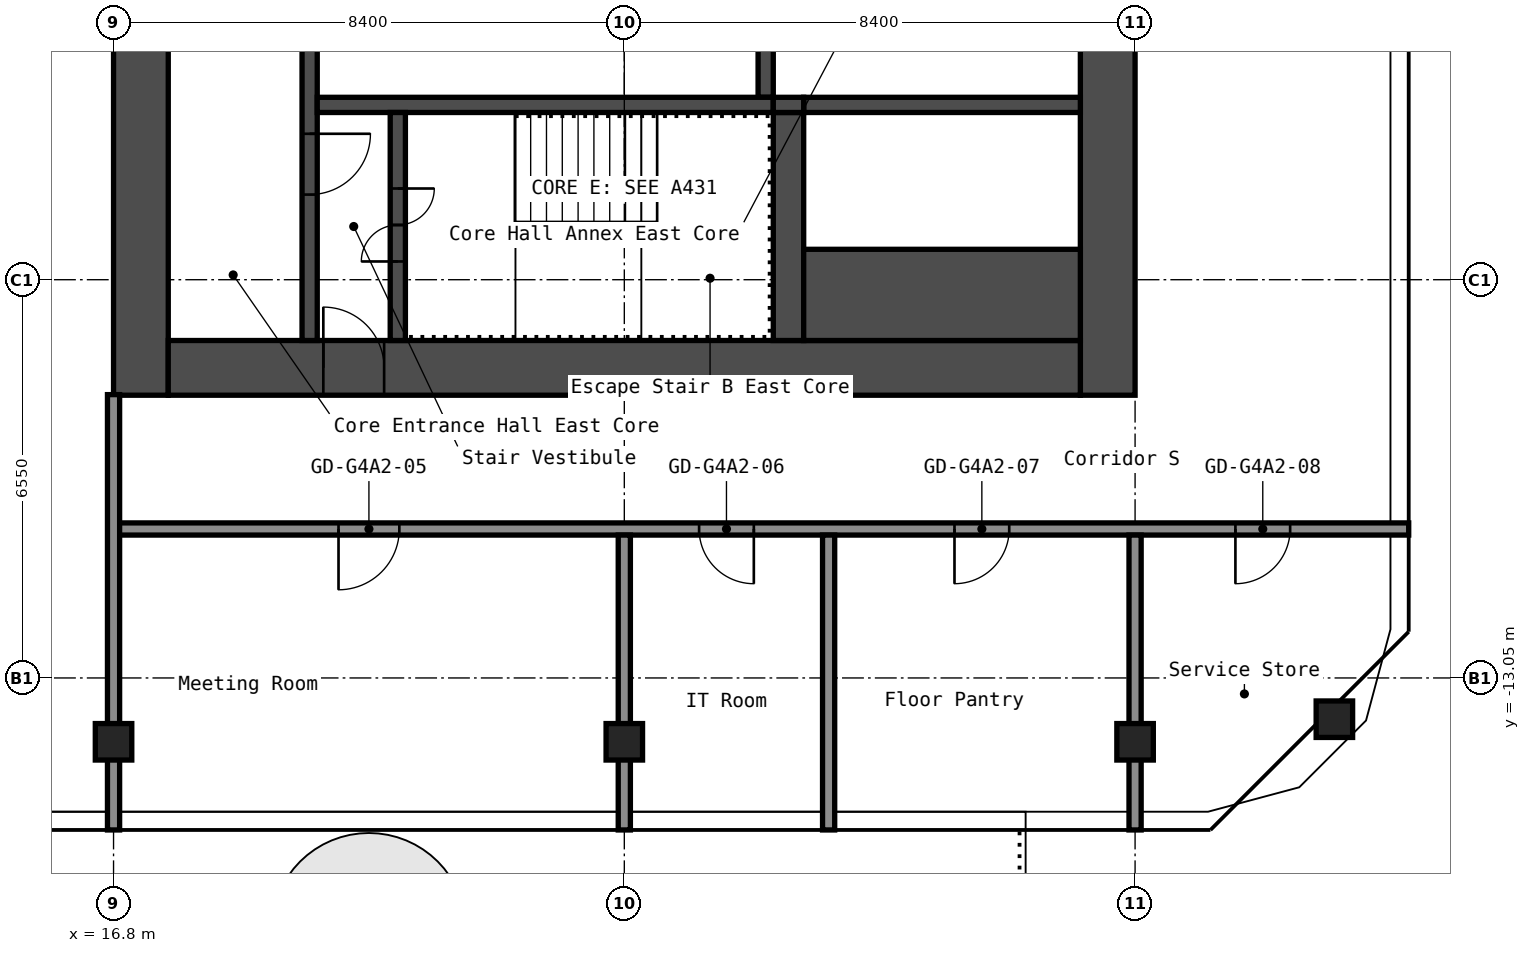
"""IFC4 building model, lengths in metres.
Left out: names, types, materials, properties, quantities, classifications, styles, units other than length and angle.
Written with IfcOpenShell. Run it as: python <this file> out.ifc"""

import sys

from ifc_helpers import new_model, si_unit, direction, frame, frame_2d, origin, origin_2d, place, context, subcontext, project, spatial, rectangle, hollow_rectangle, extrude, element, fill, save


model = new_model("IFC4")
c1 = context("Model", 3, precision=1e-05, world=origin(), true_north=direction((0.0, 1.0)))
c2 = subcontext(c1, "Body", "Model", "MODEL_VIEW")
j1 = project(units=[si_unit("LENGTHUNIT", "METRE"), si_unit("PLANEANGLEUNIT", "RADIAN")], contexts=[c1])
p1 = place(None, origin())
s1 = spatial("IfcSite", under=j1, at=p1, CompositionType="ELEMENT")
p2 = place(p1, origin())
s2 = spatial("IfcBuilding", under=s1, at=p2, CompositionType="ELEMENT")
p3 = place(p2, frame((0.0, 0.0, 218.6)))
s3 = spatial("IfcBuildingStorey", under=s2, at=p3, CompositionType="ELEMENT", Elevation=218.6)
for number, where, z_axis, x_axis in (
    (1, (16.8, -14.1, 0.0), (0.0, 0.0, 1.0), (1.0, 0.0, 0.0)),
    (2, (25.2, -14.1, 0.0), (0.0, 0.0, 1.0), (1.0, 0.0, 0.0)),
    (3, (33.6, -14.1, 0.0), (0.0, 0.0, 1.0), (1.0, 0.0, 0.0)),
    (4, (36.878, -13.729, 0.0), (0.0, 0.0, 1.0), (1.0, 0.0, 0.0)),
):
    element("IfcColumn", number, at=place(p3, frame(where, z_axis=z_axis, x_axis=x_axis)), inside=s3, PredefinedType="COLUMN", context=c2, shape_type="SweptSolid", body=[
        extrude(hollow_rectangle(XDim=0.6, YDim=0.6, WallThickness=0.025, InnerFilletRadius=0.038, OuterFilletRadius=0.062, at=origin_2d()), origin(), (0.0, 0.0, 1.0), 2.75),
    ])
p4 = place(p3, frame((17.25, -8.4, 0.0), z_axis=(0.0, 0.0, 1.0), x_axis=(0.0, 1.0, 0.0)))
e5 = element("IfcWall", 5, at=p4, inside=s3, PredefinedType="SHEAR", context=c2, shape_type="SweptSolid", body=[
    extrude(rectangle(XDim=16.8, YDim=0.9, at=frame_2d((8.4, 0.0))), origin(), (0.0, 0.0, 1.0), 2.75),
])
p5 = place(p4, frame((10.1, 0.0, 0.0)))
e6 = element("IfcOpeningElement", 6, at=p5, cuts=e5, PredefinedType="OPENING", context=c2, shape_type="SweptSolid", body=[
    extrude(rectangle(XDim=1.6, YDim=2.1, at=frame_2d((0.8, 1.05))), frame((0.0, 0.46, 0.0), z_axis=(0.0, -1.0, 0.0), x_axis=(1.0, 0.0, 0.0)), (0.0, 0.0, 1.0), 0.92),
])
p6 = place(p3, frame((33.15, -8.4, 0.0), z_axis=(0.0, 0.0, 1.0), x_axis=(0.0, 1.0, 0.0)))
e7 = element("IfcWall", 7, at=p6, inside=s3, PredefinedType="SHEAR", context=c2, shape_type="SweptSolid", body=[
    extrude(rectangle(XDim=16.8, YDim=0.9, at=frame_2d((8.4, 0.0))), origin(), (0.0, 0.0, 1.0), 2.75),
])
p7 = place(p3, frame((17.7, -7.95, 0.0), z_axis=(0.0, 0.0, 1.0), x_axis=(1.0, 0.0, 0.0)))
e8 = element("IfcWall", 8, at=p7, inside=s3, PredefinedType="SHEAR", context=c2, shape_type="SweptSolid", body=[
    extrude(rectangle(XDim=15.0, YDim=0.9, at=frame_2d((7.5, 0.0))), origin(), (0.0, 0.0, 1.0), 2.75),
])
p8 = place(p7, frame((2.55, 0.0, 0.0)))
e9 = element("IfcOpeningElement", 9, at=p8, cuts=e8, PredefinedType="OPENING", context=c2, shape_type="SweptSolid", body=[
    extrude(rectangle(XDim=1.0, YDim=2.1, at=frame_2d((0.5, 1.05))), frame((0.0, 0.46, 0.0), z_axis=(0.0, -1.0, 0.0), x_axis=(1.0, 0.0, 0.0)), (0.0, 0.0, 1.0), 0.92),
])
p9 = place(p3, frame((20.025, -7.5, 0.0), z_axis=(0.0, 0.0, 1.0), x_axis=(0.0, 1.0, 0.0)))
e10 = element("IfcWall", 10, at=p9, inside=s3, PredefinedType="SHEAR", context=c2, shape_type="SweptSolid", body=[
    extrude(rectangle(XDim=6.3, YDim=0.25, at=frame_2d((3.15, 0.0))), origin(), (0.0, 0.0, 1.0), 2.75),
])
p10 = place(p9, frame((2.4, 0.0, 0.0)))
e11 = element("IfcOpeningElement", 11, at=p10, cuts=e10, PredefinedType="OPENING", context=c2, shape_type="SweptSolid", body=[
    extrude(rectangle(XDim=1.0, YDim=2.1, at=frame_2d((0.5, 1.05))), frame((0.0, 0.135, 0.0), z_axis=(0.0, -1.0, 0.0), x_axis=(1.0, 0.0, 0.0)), (0.0, 0.0, 1.0), 0.27),
])
p11 = place(p3, frame((27.525, -3.5, 0.0), z_axis=(0.0, 0.0, 1.0), x_axis=(0.0, 1.0, 0.0)))
e12 = element("IfcWall", 12, at=p11, inside=s3, PredefinedType="SHEAR", context=c2, shape_type="SweptSolid", body=[
    extrude(rectangle(XDim=2.05, YDim=0.25, at=frame_2d((1.025, 0.0))), origin(), (0.0, 0.0, 1.0), 2.75),
])
p12 = place(p3, frame((20.15, -3.625, 0.0), z_axis=(0.0, 0.0, 1.0), x_axis=(1.0, 0.0, 0.0)))
e13 = element("IfcWall", 13, at=p12, inside=s3, PredefinedType="SHEAR", context=c2, shape_type="SweptSolid", body=[
    extrude(rectangle(XDim=7.5, YDim=0.25, at=frame_2d((3.75, 0.0))), origin(), (0.0, 0.0, 1.0), 2.75),
])
p13 = place(p3, frame((21.475, -7.5, 0.0), z_axis=(0.0, 0.0, 1.0), x_axis=(0.0, 1.0, 0.0)))
e14 = element("IfcWall", 14, at=p13, inside=s3, PredefinedType="SHEAR", context=c2, shape_type="SweptSolid", body=[
    extrude(rectangle(XDim=3.75, YDim=0.25, at=frame_2d((1.875, 0.0))), origin(), (0.0, 0.0, 1.0), 2.75),
])
p14 = place(p13, frame((1.3, 0.0, 0.0)))
e15 = element("IfcOpeningElement", 15, at=p14, cuts=e14, PredefinedType="OPENING", context=c2, shape_type="SweptSolid", body=[
    extrude(rectangle(XDim=1.2, YDim=2.1, at=frame_2d((0.6, 1.05))), frame((0.0, 0.135, 0.0), z_axis=(0.0, -1.0, 0.0), x_axis=(1.0, 0.0, 0.0)), (0.0, 0.0, 1.0), 0.27),
])
p15 = place(p3, frame((27.9, -7.5, 0.0), z_axis=(0.0, 0.0, 1.0), x_axis=(0.0, 1.0, 0.0)))
e16 = element("IfcWall", 16, at=p15, inside=s3, PredefinedType="SHEAR", context=c2, shape_type="SweptSolid", body=[
    extrude(rectangle(XDim=3.75, YDim=0.5, at=frame_2d((1.875, 0.0))), origin(), (0.0, 0.0, 1.0), 2.75),
])
p16 = place(p3, frame((28.15, -3.625, 0.0), z_axis=(0.0, 0.0, 1.0), x_axis=(1.0, 0.0, 0.0)))
e17 = element("IfcWall", 17, at=p16, inside=s3, PredefinedType="SHEAR", context=c2, shape_type="SweptSolid", body=[
    extrude(rectangle(XDim=4.55, YDim=0.25, at=frame_2d((2.275, 0.0))), origin(), (0.0, 0.0, 1.0), 2.75),
])
p17 = place(p3, frame((28.15, -6.75, 0.0), z_axis=(0.0, 0.0, 1.0), x_axis=(1.0, 0.0, 0.0)))
e18 = element("IfcWall", 18, at=p17, inside=s3, PredefinedType="SHEAR", context=c2, shape_type="SweptSolid", body=[
    extrude(rectangle(XDim=4.55, YDim=1.5, at=frame_2d((2.275, 0.0))), origin(), (0.0, 0.0, 1.0), 2.75),
])
p18 = place(p3, frame((27.65, -3.625, 0.0), z_axis=(0.0, 0.0, 1.0), x_axis=(1.0, 0.0, 0.0)))
e19 = element("IfcWall", 19, at=p18, inside=s3, PredefinedType="SHEAR", context=c2, shape_type="SweptSolid", body=[
    extrude(rectangle(XDim=0.5, YDim=0.25, at=frame_2d((0.25, 0.0))), origin(), (0.0, 0.0, 1.0), 2.75),
])
p19 = place(p3, frame((16.8, -10.6, 0.0), z_axis=(0.0, 0.0, 1.0), x_axis=(1.0, 0.0, 0.0)))
e20 = element("IfcWall", 20, at=p19, inside=s3, PredefinedType="PARTITIONING", context=c2, shape_type="SweptSolid", body=[
    extrude(rectangle(XDim=21.3, YDim=0.2, at=frame_2d((10.65, 0.0))), origin(), (0.0, 0.0, 1.0), 2.75),
])
p20 = place(p19, frame((3.7, 0.0, 0.0)))
e21 = element("IfcOpeningElement", 21, at=p20, cuts=e20, PredefinedType="OPENING", context=c2, shape_type="SweptSolid", body=[
    extrude(rectangle(XDim=1.0, YDim=2.1, at=frame_2d((0.5, 1.05))), frame((0.0, 0.11, 0.0), z_axis=(0.0, -1.0, 0.0), x_axis=(1.0, 0.0, 0.0)), (0.0, 0.0, 1.0), 0.22),
])
p21 = place(p19, frame((9.63, 0.0, 0.0)))
e22 = element("IfcOpeningElement", 22, at=p21, cuts=e20, PredefinedType="OPENING", context=c2, shape_type="SweptSolid", body=[
    extrude(rectangle(XDim=0.9, YDim=2.1, at=frame_2d((0.45, 1.05))), frame((0.0, 0.11, 0.0), z_axis=(0.0, -1.0, 0.0), x_axis=(1.0, 0.0, 0.0)), (0.0, 0.0, 1.0), 0.22),
])
p22 = place(p19, frame((13.83, 0.0, 0.0)))
e23 = element("IfcOpeningElement", 23, at=p22, cuts=e20, PredefinedType="OPENING", context=c2, shape_type="SweptSolid", body=[
    extrude(rectangle(XDim=0.9, YDim=2.1, at=frame_2d((0.45, 1.05))), frame((0.0, 0.11, 0.0), z_axis=(0.0, -1.0, 0.0), x_axis=(1.0, 0.0, 0.0)), (0.0, 0.0, 1.0), 0.22),
])
p23 = place(p19, frame((18.45, 0.0, 0.0)))
e24 = element("IfcOpeningElement", 24, at=p23, cuts=e20, PredefinedType="OPENING", context=c2, shape_type="SweptSolid", body=[
    extrude(rectangle(XDim=0.9, YDim=2.1, at=frame_2d((0.45, 1.05))), frame((0.0, 0.11, 0.0), z_axis=(0.0, -1.0, 0.0), x_axis=(1.0, 0.0, 0.0)), (0.0, 0.0, 1.0), 0.22),
])
p24 = place(p3, frame((16.8, -15.55, 0.0), z_axis=(0.0, 0.0, 1.0), x_axis=(0.0, 1.0, 0.0)))
e25 = element("IfcWall", 25, at=p24, inside=s3, PredefinedType="PARTITIONING", context=c2, shape_type="SweptSolid", body=[
    extrude(rectangle(XDim=7.16, YDim=0.2, at=frame_2d((3.58, 0.0))), origin(), (0.0, 0.0, 1.0), 2.75),
])
for number, where, z_axis, x_axis in (
    (26, (25.2, -15.55, 0.0), (0.0, 0.0, 1.0), (0.0, 1.0, 0.0)),
    (27, (28.56, -15.55, 0.0), (0.0, 0.0, 1.0), (0.0, 1.0, 0.0)),
    (28, (33.6, -15.55, 0.0), (0.0, 0.0, 1.0), (0.0, 1.0, 0.0)),
):
    element("IfcWall", number, at=place(p3, frame(where, z_axis=z_axis, x_axis=x_axis)), inside=s3, PredefinedType="PARTITIONING", context=c2, shape_type="SweptSolid", body=[
        extrude(rectangle(XDim=4.85, YDim=0.2, at=frame_2d((2.425, 0.0))), origin(), (0.0, 0.0, 1.0), 2.75),
    ])
p25 = place(p8, origin())
e29 = element("IfcDoor", 29, at=p25, inside=s3, OperationType="SINGLE_SWING_RIGHT", PredefinedType="DOOR", context=c2, shape_type="SweptSolid", body=[
    extrude(rectangle(XDim=1.0, YDim=2.1, at=frame_2d((0.5, 1.05))), frame((0.0, 0.025, 0.0), z_axis=(0.0, -1.0, 0.0), x_axis=(1.0, 0.0, 0.0)), (0.0, 0.0, 1.0), 0.05),
])
fill(e9, e29)
p26 = place(p14, origin())
e30 = element("IfcDoor", 30, at=p26, inside=s3, OperationType="DOUBLE_DOOR_SINGLE_SWING", PredefinedType="DOOR", context=c2, shape_type="SweptSolid", body=[
    extrude(rectangle(XDim=1.2, YDim=2.1, at=frame_2d((0.6, 1.05))), frame((0.0, 0.025, 0.0), z_axis=(0.0, -1.0, 0.0), x_axis=(1.0, 0.0, 0.0)), (0.0, 0.0, 1.0), 0.05),
])
fill(e15, e30)
p27 = place(p10, origin())
e31 = element("IfcDoor", 31, at=p27, inside=s3, OperationType="SINGLE_SWING_RIGHT", PredefinedType="DOOR", context=c2, shape_type="SweptSolid", body=[
    extrude(rectangle(XDim=1.0, YDim=2.1, at=frame_2d((0.5, 1.05))), frame((0.0, 0.025, 0.0), z_axis=(0.0, -1.0, 0.0), x_axis=(1.0, 0.0, 0.0)), (0.0, 0.0, 1.0), 0.05),
])
fill(e11, e31)
p28 = place(p20, origin())
e32 = element("IfcDoor", 32, at=p28, inside=s3, OperationType="SINGLE_SWING_LEFT", PredefinedType="DOOR", context=c2, shape_type="SweptSolid", body=[
    extrude(rectangle(XDim=1.0, YDim=2.1, at=frame_2d((0.5, 1.05))), frame((0.0, 0.025, 0.0), z_axis=(0.0, -1.0, 0.0), x_axis=(1.0, 0.0, 0.0)), (0.0, 0.0, 1.0), 0.05),
])
fill(e21, e32)
p29 = place(p21, origin())
e33 = element("IfcDoor", 33, at=p29, inside=s3, OperationType="SINGLE_SWING_RIGHT", PredefinedType="DOOR", context=c2, shape_type="SweptSolid", body=[
    extrude(rectangle(XDim=0.9, YDim=2.1, at=frame_2d((0.45, 1.05))), frame((0.0, 0.025, 0.0), z_axis=(0.0, -1.0, 0.0), x_axis=(1.0, 0.0, 0.0)), (0.0, 0.0, 1.0), 0.05),
])
fill(e22, e33)
p30 = place(p22, origin())
e34 = element("IfcDoor", 34, at=p30, inside=s3, OperationType="SINGLE_SWING_LEFT", PredefinedType="DOOR", context=c2, shape_type="SweptSolid", body=[
    extrude(rectangle(XDim=0.9, YDim=2.1, at=frame_2d((0.45, 1.05))), frame((0.0, 0.025, 0.0), z_axis=(0.0, -1.0, 0.0), x_axis=(1.0, 0.0, 0.0)), (0.0, 0.0, 1.0), 0.05),
])
fill(e23, e34)
p31 = place(p23, origin())
e35 = element("IfcDoor", 35, at=p31, inside=s3, OperationType="SINGLE_SWING_LEFT", PredefinedType="DOOR", context=c2, shape_type="SweptSolid", body=[
    extrude(rectangle(XDim=0.9, YDim=2.1, at=frame_2d((0.45, 1.05))), frame((0.0, 0.025, 0.0), z_axis=(0.0, -1.0, 0.0), x_axis=(1.0, 0.0, 0.0)), (0.0, 0.0, 1.0), 0.05),
])
fill(e24, e35)
save(model, sys.argv[1])
